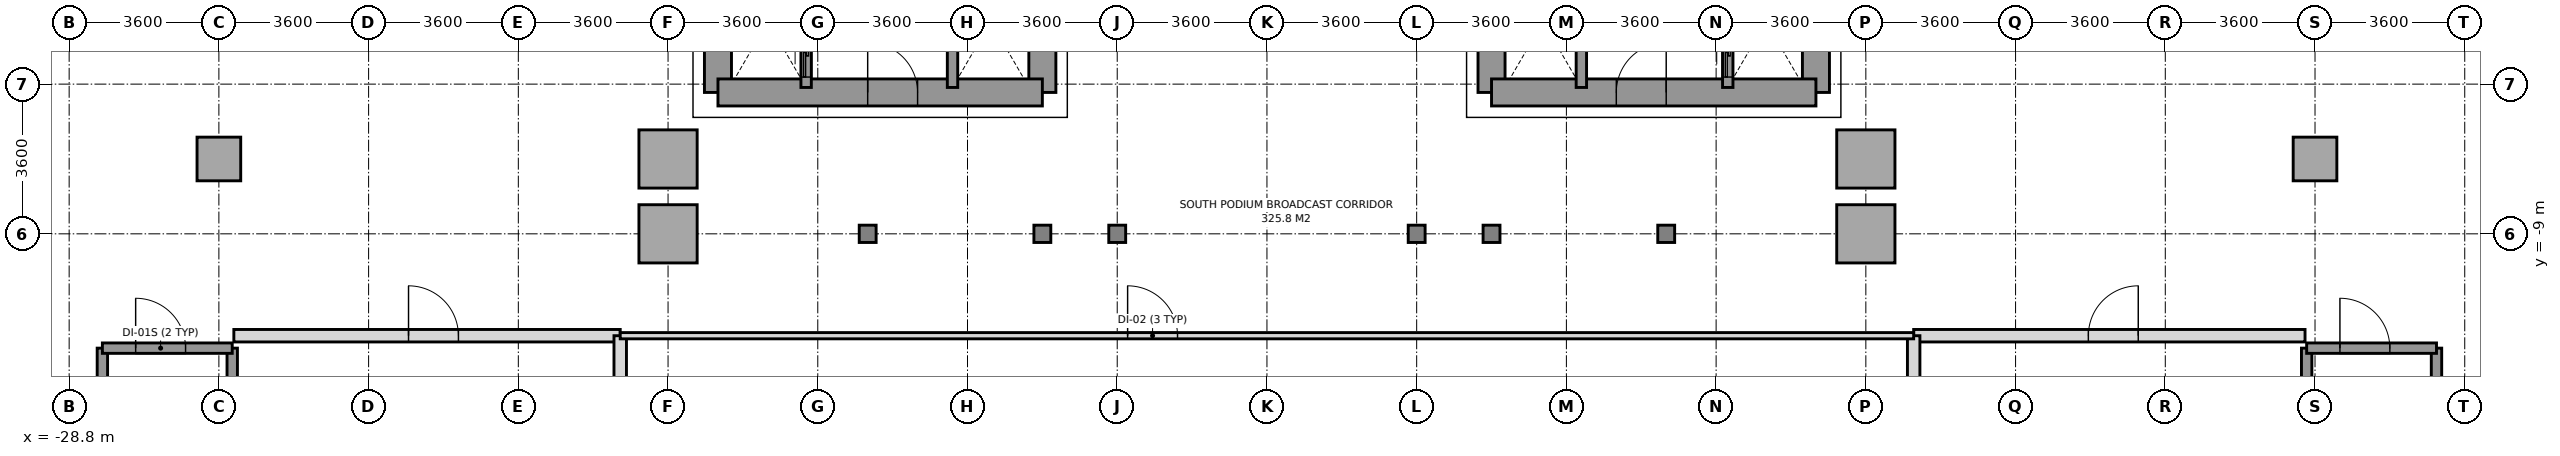
"""IFC4 building model, lengths in metres.
Left out: names, types, materials, properties, quantities, classifications, styles, units other than length and angle.
Written with IfcOpenShell. Run it as: python <this file> out.ifc"""

import sys

from ifc_helpers import new_model, si_unit, direction, frame, frame_2d, origin, origin_2d, place, context, subcontext, project, spatial, rectangle, i_section, extrude, source, transform, mapped, element, fill, save


model = new_model("IFC4")
c1 = context("Model", 3, precision=1e-05, world=origin(), true_north=direction((0.0, 1.0)))
c2 = subcontext(c1, "Body", "Model", "MODEL_VIEW")
j1 = project(units=[si_unit("LENGTHUNIT", "METRE"), si_unit("PLANEANGLEUNIT", "RADIAN")], contexts=[c1])
p1 = place(None, origin())
s1 = spatial("IfcSite", under=j1, at=p1, CompositionType="ELEMENT")
p2 = place(p1, origin())
s2 = spatial("IfcBuilding", under=s1, at=p2, CompositionType="ELEMENT")
p3 = place(p2, frame((0.0, 0.0, 15.6)))
s3 = spatial("IfcBuildingStorey", under=s2, at=p3, CompositionType="ELEMENT", Elevation=15.6)
m1 = source(origin(), c2, "Body", "SweptSolid", [
    extrude(rectangle(XDim=1.05, YDim=1.05, at=origin_2d()), origin(), (0.0, 0.0, 1.0), 4.55),
])
p4 = place(p3, frame((-25.2, -7.2, 0.0), z_axis=(0.0, 0.0, 1.0), x_axis=(1.0, 0.0, 0.0)))
e1 = element("IfcColumn", 1, at=p4, inside=s3, PredefinedType="COLUMN", context=c2, shape_type="MappedRepresentation", body=[
    mapped(m1, transform((0.0, 0.0, 0.0), x_axis=(1.0, 0.0, 0.0), y_axis=(0.0, 1.0, 0.0), z_axis=(0.0, 0.0, 1.0), scale=1.0)),
])
m2 = source(origin(), c2, "Body", "SweptSolid", [
    extrude(rectangle(XDim=1.4, YDim=1.4, at=origin_2d()), origin(), (0.0, 0.0, 1.0), 4.55),
])
for number, where, z_axis, x_axis in (
    (2, (-14.4, -9.0, 0.0), (0.0, 0.0, 1.0), (1.0, 0.0, 0.0)),
    (3, (-14.4, -7.2, 0.0), (0.0, 0.0, 1.0), (1.0, 0.0, 0.0)),
):
    element("IfcColumn", number, at=place(p3, frame(where, z_axis=z_axis, x_axis=x_axis)), inside=s3, PredefinedType="COLUMN", context=c2, shape_type="MappedRepresentation", body=[
        mapped(m2, transform((0.0, 0.0, 0.0), x_axis=(1.0, 0.0, 0.0), y_axis=(0.0, 1.0, 0.0), z_axis=(0.0, 0.0, 1.0), scale=1.0)),
    ])
m3 = source(origin(), c2, "Body", "SweptSolid", [
    extrude(i_section(OverallWidth=0.406, OverallDepth=0.416, WebThickness=0.024, FlangeThickness=0.039, at=origin_2d()), origin(), (0.0, 0.0, 1.0), 4.55),
])
for number, where, z_axis, x_axis in (
    (4, (-9.6, -9.0, 0.0), (0.0, 0.0, 1.0), (1.0, 0.0, 0.0)),
    (5, (-5.4, -9.0, 0.0), (0.0, 0.0, 1.0), (1.0, 0.0, 0.0)),
    (6, (-3.6, -9.0, 0.0), (0.0, 0.0, 1.0), (1.0, 0.0, 0.0)),
    (7, (3.6, -9.0, 0.0), (0.0, 0.0, 1.0), (1.0, 0.0, 0.0)),
    (8, (5.4, -9.0, 0.0), (0.0, 0.0, 1.0), (1.0, 0.0, 0.0)),
    (9, (9.6, -9.0, 0.0), (0.0, 0.0, 1.0), (1.0, 0.0, 0.0)),
):
    element("IfcColumn", number, at=place(p3, frame(where, z_axis=z_axis, x_axis=x_axis)), inside=s3, PredefinedType="COLUMN", context=c2, shape_type="MappedRepresentation", body=[
        mapped(m3, transform((0.0, 0.0, 0.0), x_axis=(1.0, 0.0, 0.0), y_axis=(0.0, 1.0, 0.0), z_axis=(0.0, 0.0, 1.0), scale=1.0)),
    ])
for number, where, z_axis, x_axis in (
    (10, (14.4, -9.0, 0.0), (0.0, 0.0, 1.0), (1.0, 0.0, 0.0)),
    (11, (14.4, -7.2, 0.0), (0.0, 0.0, 1.0), (1.0, 0.0, 0.0)),
):
    element("IfcColumn", number, at=place(p3, frame(where, z_axis=z_axis, x_axis=x_axis)), inside=s3, PredefinedType="COLUMN", context=c2, shape_type="MappedRepresentation", body=[
        mapped(m2, transform((0.0, 0.0, 0.0), x_axis=(1.0, 0.0, 0.0), y_axis=(0.0, 1.0, 0.0), z_axis=(0.0, 0.0, 1.0), scale=1.0)),
    ])
p5 = place(p3, frame((25.2, -7.2, 0.0), z_axis=(0.0, 0.0, 1.0), x_axis=(1.0, 0.0, 0.0)))
e12 = element("IfcColumn", 12, at=p5, inside=s3, PredefinedType="COLUMN", context=c2, shape_type="MappedRepresentation", body=[
    mapped(m1, transform((0.0, 0.0, 0.0), x_axis=(1.0, 0.0, 0.0), y_axis=(0.0, 1.0, 0.0), z_axis=(0.0, 0.0, 1.0), scale=1.0)),
])
p6 = place(p3, frame((-13.2, -5.6, 0.0), z_axis=(0.0, 0.0, 1.0), x_axis=(0.0, 1.0, 0.0)))
e13 = element("IfcWall", 13, at=p6, inside=s3, PredefinedType="SHEAR", context=c2, shape_type="SweptSolid", body=[
    extrude(rectangle(XDim=11.2, YDim=0.65, at=frame_2d((5.6, 0.0))), origin(), (0.0, 0.0, 1.0), 4.55),
])
p7 = place(p3, frame((-5.4, -5.6, 0.0), z_axis=(0.0, 0.0, 1.0), x_axis=(0.0, 1.0, 0.0)))
e14 = element("IfcWall", 14, at=p7, inside=s3, PredefinedType="SHEAR", context=c2, shape_type="SweptSolid", body=[
    extrude(rectangle(XDim=12.5, YDim=0.65, at=frame_2d((6.25, 0.0))), origin(), (0.0, 0.0, 1.0), 4.55),
])
p8 = place(p7, frame((4.55, 0.0, 0.0)))
e15 = element("IfcOpeningElement", 15, at=p8, cuts=e14, PredefinedType="OPENING", context=c2, shape_type="SweptSolid", body=[
    extrude(rectangle(XDim=1.2, YDim=2.2, at=frame_2d((0.6, 1.1))), frame((0.0, 0.335, 0.0), z_axis=(0.0, -1.0, 0.0), x_axis=(1.0, 0.0, 0.0)), (0.0, 0.0, 1.0), 0.67),
])
p9 = place(p7, frame((6.86, 0.0, 0.0)))
e16 = element("IfcOpeningElement", 16, at=p9, cuts=e14, PredefinedType="OPENING", context=c2, shape_type="SweptSolid", body=[
    extrude(rectangle(XDim=0.8, YDim=2.1, at=frame_2d((0.4, 1.05))), frame((0.0, 0.335, 0.0), z_axis=(0.0, -1.0, 0.0), x_axis=(1.0, 0.0, 0.0)), (0.0, 0.0, 1.0), 0.67),
])
p10 = place(p7, frame((7.88, 0.0, 0.0)))
e17 = element("IfcOpeningElement", 17, at=p10, cuts=e14, PredefinedType="OPENING", context=c2, shape_type="SweptSolid", body=[
    extrude(rectangle(XDim=0.8, YDim=2.1, at=frame_2d((0.4, 1.05))), frame((0.0, 0.335, 0.0), z_axis=(0.0, -1.0, 0.0), x_axis=(1.0, 0.0, 0.0)), (0.0, 0.0, 1.0), 0.67),
])
p11 = place(p3, frame((-13.2, -5.6, 0.0), z_axis=(0.0, 0.0, 1.0), x_axis=(1.0, 0.0, 0.0)))
e18 = element("IfcWall", 18, at=p11, inside=s3, PredefinedType="SHEAR", context=c2, shape_type="SweptSolid", body=[
    extrude(rectangle(XDim=7.8, YDim=0.65, at=frame_2d((3.9, 0.0))), origin(), (0.0, 0.0, 1.0), 4.55),
])
p12 = place(p11, frame((3.6, 0.0, 0.0)))
e19 = element("IfcOpeningElement", 19, at=p12, cuts=e18, PredefinedType="OPENING", context=c2, shape_type="SweptSolid", body=[
    extrude(rectangle(XDim=1.2, YDim=2.2, at=frame_2d((0.6, 1.1))), frame((0.0, 0.335, 0.0), z_axis=(0.0, -1.0, 0.0), x_axis=(1.0, 0.0, 0.0)), (0.0, 0.0, 1.0), 0.67),
])
p13 = place(p3, frame((13.2, -5.6, 0.0), z_axis=(0.0, 0.0, 1.0), x_axis=(0.0, 1.0, 0.0)))
e20 = element("IfcWall", 20, at=p13, inside=s3, PredefinedType="SHEAR", context=c2, shape_type="SweptSolid", body=[
    extrude(rectangle(XDim=11.2, YDim=0.65, at=frame_2d((5.6, 0.0))), origin(), (0.0, 0.0, 1.0), 4.55),
])
p14 = place(p3, frame((5.4, -5.6, 0.0), z_axis=(0.0, 0.0, 1.0), x_axis=(0.0, 1.0, 0.0)))
e21 = element("IfcWall", 21, at=p14, inside=s3, PredefinedType="SHEAR", context=c2, shape_type="SweptSolid", body=[
    extrude(rectangle(XDim=12.5, YDim=0.65, at=frame_2d((6.25, 0.0))), origin(), (0.0, 0.0, 1.0), 4.55),
])
p15 = place(p14, frame((4.55, 0.0, 0.0)))
e22 = element("IfcOpeningElement", 22, at=p15, cuts=e21, PredefinedType="OPENING", context=c2, shape_type="SweptSolid", body=[
    extrude(rectangle(XDim=1.2, YDim=2.2, at=frame_2d((0.6, 1.1))), frame((0.0, 0.335, 0.0), z_axis=(0.0, -1.0, 0.0), x_axis=(1.0, 0.0, 0.0)), (0.0, 0.0, 1.0), 0.67),
])
p16 = place(p3, frame((5.4, -5.6, 0.0), z_axis=(0.0, 0.0, 1.0), x_axis=(1.0, 0.0, 0.0)))
e23 = element("IfcWall", 23, at=p16, inside=s3, PredefinedType="SHEAR", context=c2, shape_type="SweptSolid", body=[
    extrude(rectangle(XDim=7.8, YDim=0.65, at=frame_2d((3.9, 0.0))), origin(), (0.0, 0.0, 1.0), 4.55),
])
p17 = place(p16, frame((3.0, 0.0, 0.0)))
e24 = element("IfcOpeningElement", 24, at=p17, cuts=e23, PredefinedType="OPENING", context=c2, shape_type="SweptSolid", body=[
    extrude(rectangle(XDim=1.2, YDim=2.2, at=frame_2d((0.6, 1.1))), frame((0.0, 0.335, 0.0), z_axis=(0.0, -1.0, 0.0), x_axis=(1.0, 0.0, 0.0)), (0.0, 0.0, 1.0), 0.67),
])
for number, where, z_axis, x_axis in (
    (25, (-28.001, -18.671, 0.0), (0.0, 0.0, 1.0), (0.0, 1.0, 0.0)),
    (26, (-24.879, -18.671, 0.0), (0.0, 0.0, 1.0), (0.0, 1.0, 0.0)),
):
    element("IfcWall", number, at=place(p3, frame(where, z_axis=z_axis, x_axis=x_axis)), inside=s3, PredefinedType="SOLIDWALL", context=c2, shape_type="SweptSolid", body=[
        extrude(rectangle(XDim=6.922, YDim=0.25, at=frame_2d((3.461, 0.0))), origin(), (0.0, 0.0, 1.0), 4.55),
    ])
p18 = place(p3, frame((-28.001, -11.749, 0.0), z_axis=(0.0, 0.0, 1.0), x_axis=(1.0, 0.0, 0.0)))
e27 = element("IfcWall", 27, at=p18, inside=s3, PredefinedType="SOLIDWALL", context=c2, shape_type="SweptSolid", body=[
    extrude(rectangle(XDim=3.122, YDim=0.25, at=frame_2d((1.561, 0.0))), origin(), (0.0, 0.0, 1.0), 4.55),
])
p19 = place(p18, frame((0.8, 0.0, 0.0)))
e28 = element("IfcOpeningElement", 28, at=p19, cuts=e27, PredefinedType="OPENING", context=c2, shape_type="SweptSolid", body=[
    extrude(rectangle(XDim=1.2, YDim=2.2, at=frame_2d((0.6, 1.1))), frame((0.0, 0.135, 0.0), z_axis=(0.0, -1.0, 0.0), x_axis=(1.0, 0.0, 0.0)), (0.0, 0.0, 1.0), 0.27),
])
for number, where, z_axis, x_axis in (
    (29, (24.999, -18.671, 0.0), (0.0, 0.0, 1.0), (0.0, 1.0, 0.0)),
    (30, (28.121, -18.671, 0.0), (0.0, 0.0, 1.0), (0.0, 1.0, 0.0)),
):
    element("IfcWall", number, at=place(p3, frame(where, z_axis=z_axis, x_axis=x_axis)), inside=s3, PredefinedType="SOLIDWALL", context=c2, shape_type="SweptSolid", body=[
        extrude(rectangle(XDim=6.922, YDim=0.25, at=frame_2d((3.461, 0.0))), origin(), (0.0, 0.0, 1.0), 4.55),
    ])
p20 = place(p3, frame((24.999, -11.749, 0.0), z_axis=(0.0, 0.0, 1.0), x_axis=(1.0, 0.0, 0.0)))
e31 = element("IfcWall", 31, at=p20, inside=s3, PredefinedType="SOLIDWALL", context=c2, shape_type="SweptSolid", body=[
    extrude(rectangle(XDim=3.122, YDim=0.25, at=frame_2d((1.561, 0.0))), origin(), (0.0, 0.0, 1.0), 4.55),
])
p21 = place(p20, frame((0.8, 0.0, 0.0)))
e32 = element("IfcOpeningElement", 32, at=p21, cuts=e31, PredefinedType="OPENING", context=c2, shape_type="SweptSolid", body=[
    extrude(rectangle(XDim=1.2, YDim=2.2, at=frame_2d((0.6, 1.1))), frame((0.0, 0.135, 0.0), z_axis=(0.0, -1.0, 0.0), x_axis=(1.0, 0.0, 0.0)), (0.0, 0.0, 1.0), 0.27),
])
p22 = place(p3, frame((-11.08, -5.48, 0.0), z_axis=(0.0, 0.0, 1.0), x_axis=(0.0, 1.0, 0.0)))
e33 = element("IfcWall", 33, at=p22, inside=s3, PredefinedType="SOLIDWALL", context=c2, shape_type="SweptSolid", body=[
    extrude(rectangle(XDim=1.6, YDim=0.25, at=frame_2d((0.8, 0.0))), origin(), (0.0, 0.0, 1.0), 4.55),
])
p23 = place(p22, frame((0.25, 0.0, 0.0)))
e34 = element("IfcOpeningElement", 34, at=p23, cuts=e33, PredefinedType="OPENING", context=c2, shape_type="SweptSolid", body=[
    extrude(rectangle(XDim=1.1, YDim=2.2, at=frame_2d((0.55, 1.1))), frame((0.0, 0.135, 0.0), z_axis=(0.0, -1.0, 0.0), x_axis=(1.0, 0.0, 0.0)), (0.0, 0.0, 1.0), 0.27),
])
p24 = place(p3, frame((11.08, -5.48, 0.0), z_axis=(0.0, 0.0, 1.0), x_axis=(0.0, 1.0, 0.0)))
e35 = element("IfcWall", 35, at=p24, inside=s3, PredefinedType="SOLIDWALL", context=c2, shape_type="SweptSolid", body=[
    extrude(rectangle(XDim=1.6, YDim=0.25, at=frame_2d((0.8, 0.0))), origin(), (0.0, 0.0, 1.0), 4.55),
])
p25 = place(p24, frame((0.25, 0.0, 0.0)))
e36 = element("IfcOpeningElement", 36, at=p25, cuts=e35, PredefinedType="OPENING", context=c2, shape_type="SweptSolid", body=[
    extrude(rectangle(XDim=1.1, YDim=2.2, at=frame_2d((0.55, 1.1))), frame((0.0, 0.135, 0.0), z_axis=(0.0, -1.0, 0.0), x_axis=(1.0, 0.0, 0.0)), (0.0, 0.0, 1.0), 0.27),
])
for number, where, z_axis, x_axis in (
    (37, (-7.56, -5.48, 0.0), (0.0, 0.0, 1.0), (0.0, 1.0, 0.0)),
    (38, (7.56, -5.48, 0.0), (0.0, 0.0, 1.0), (0.0, 1.0, 0.0)),
):
    element("IfcWall", number, at=place(p3, frame(where, z_axis=z_axis, x_axis=x_axis)), inside=s3, PredefinedType="SOLIDWALL", context=c2, shape_type="SweptSolid", body=[
        extrude(rectangle(XDim=1.6, YDim=0.25, at=frame_2d((0.8, 0.0))), origin(), (0.0, 0.0, 1.0), 4.55),
    ])
p26 = place(p3, frame((-24.84, -11.45, 0.0), z_axis=(0.0, 0.0, 1.0), x_axis=(1.0, 0.0, 0.0)))
e39 = element("IfcWall", 39, at=p26, inside=s3, PredefinedType="SOLIDWALL", context=c2, shape_type="SweptSolid", body=[
    extrude(rectangle(XDim=9.29, YDim=0.3, at=frame_2d((4.645, 0.0))), origin(), (0.0, 0.0, 1.0), 4.55),
])
p27 = place(p26, frame((4.2, 0.0, 0.0)))
e40 = element("IfcOpeningElement", 40, at=p27, cuts=e39, PredefinedType="OPENING", context=c2, shape_type="SweptSolid", body=[
    extrude(rectangle(XDim=1.2, YDim=2.2, at=frame_2d((0.6, 1.1))), frame((0.0, 0.16, 0.0), z_axis=(0.0, -1.0, 0.0), x_axis=(1.0, 0.0, 0.0)), (0.0, 0.0, 1.0), 0.32),
])
p28 = place(p3, frame((-15.55, -19.45, 0.0), z_axis=(0.0, 0.0, 1.0), x_axis=(0.0, 1.0, 0.0)))
e41 = element("IfcWall", 41, at=p28, inside=s3, PredefinedType="SOLIDWALL", context=c2, shape_type="SweptSolid", body=[
    extrude(rectangle(XDim=8.0, YDim=0.3, at=frame_2d((4.0, 0.0))), origin(), (0.0, 0.0, 1.0), 3.8),
])
p29 = place(p3, frame((15.55, -11.45, 0.0), z_axis=(0.0, 0.0, 1.0), x_axis=(1.0, 0.0, 0.0)))
e42 = element("IfcWall", 42, at=p29, inside=s3, PredefinedType="SOLIDWALL", context=c2, shape_type="SweptSolid", body=[
    extrude(rectangle(XDim=9.41, YDim=0.3, at=frame_2d((4.705, 0.0))), origin(), (0.0, 0.0, 1.0), 4.55),
])
p30 = place(p29, frame((4.2, 0.0, 0.0)))
e43 = element("IfcOpeningElement", 43, at=p30, cuts=e42, PredefinedType="OPENING", context=c2, shape_type="SweptSolid", body=[
    extrude(rectangle(XDim=1.2, YDim=2.2, at=frame_2d((0.6, 1.1))), frame((0.0, 0.16, 0.0), z_axis=(0.0, -1.0, 0.0), x_axis=(1.0, 0.0, 0.0)), (0.0, 0.0, 1.0), 0.32),
])
p31 = place(p3, frame((15.55, -19.45, 0.0), z_axis=(0.0, 0.0, 1.0), x_axis=(0.0, 1.0, 0.0)))
e44 = element("IfcWall", 44, at=p31, inside=s3, PredefinedType="SOLIDWALL", context=c2, shape_type="SweptSolid", body=[
    extrude(rectangle(XDim=8.0, YDim=0.3, at=frame_2d((4.0, 0.0))), origin(), (0.0, 0.0, 1.0), 3.8),
])
p32 = place(p3, frame((-15.55, -11.45, 0.0), z_axis=(0.0, 0.0, 1.0), x_axis=(1.0, 0.0, 0.0)))
e45 = element("IfcWall", 45, at=p32, inside=s3, PredefinedType="PARTITIONING", context=c2, shape_type="SweptSolid", body=[
    extrude(rectangle(XDim=31.1, YDim=0.15, at=frame_2d((15.55, 0.0))), origin(), (0.0, 0.0, 1.0), 3.95),
])
p33 = place(p32, frame((12.2, 0.0, 0.0)))
e46 = element("IfcOpeningElement", 46, at=p33, cuts=e45, PredefinedType="OPENING", context=c2, shape_type="SweptSolid", body=[
    extrude(rectangle(XDim=1.2, YDim=2.2, at=frame_2d((0.6, 1.1))), frame((0.0, 0.085, 0.0), z_axis=(0.0, -1.0, 0.0), x_axis=(1.0, 0.0, 0.0)), (0.0, 0.0, 1.0), 0.17),
])
m4 = source(origin(), c2, "Body", "SweptSolid", [
    extrude(rectangle(XDim=1.2, YDim=2.2, at=frame_2d((0.6, 1.1))), frame((0.0, 0.025, 0.0), z_axis=(0.0, -1.0, 0.0), x_axis=(1.0, 0.0, 0.0)), (0.0, 0.0, 1.0), 0.05),
])
p34 = place(p12, origin())
e47 = element("IfcDoor", 47, at=p34, inside=s3, OperationType="SINGLE_SWING_LEFT", PredefinedType="DOOR", context=c2, shape_type="MappedRepresentation", body=[
    mapped(m4, transform((0.0, 0.0, 0.0), x_axis=(1.0, 0.0, 0.0), y_axis=(0.0, 1.0, 0.0), z_axis=(0.0, 0.0, 1.0), scale=1.0)),
])
fill(e19, e47)
p35 = place(p17, origin())
e48 = element("IfcDoor", 48, at=p35, inside=s3, OperationType="SINGLE_SWING_RIGHT", PredefinedType="DOOR", context=c2, shape_type="MappedRepresentation", body=[
    mapped(m4, transform((0.0, 0.0, 0.0), x_axis=(1.0, 0.0, 0.0), y_axis=(0.0, 1.0, 0.0), z_axis=(0.0, 0.0, 1.0), scale=1.0)),
])
fill(e24, e48)
p36 = place(p19, origin())
e49 = element("IfcDoor", 49, at=p36, inside=s3, OperationType="SINGLE_SWING_LEFT", PredefinedType="DOOR", context=c2, shape_type="MappedRepresentation", body=[
    mapped(m4, transform((0.0, 0.0, 0.0), x_axis=(1.0, 0.0, 0.0), y_axis=(0.0, 1.0, 0.0), z_axis=(0.0, 0.0, 1.0), scale=1.0)),
])
fill(e28, e49)
p37 = place(p21, origin())
e50 = element("IfcDoor", 50, at=p37, inside=s3, OperationType="SINGLE_SWING_LEFT", PredefinedType="DOOR", context=c2, shape_type="MappedRepresentation", body=[
    mapped(m4, transform((0.0, 0.0, 0.0), x_axis=(1.0, 0.0, 0.0), y_axis=(0.0, 1.0, 0.0), z_axis=(0.0, 0.0, 1.0), scale=1.0)),
])
fill(e32, e50)
m5 = source(origin(), c2, "Body", "SweptSolid", [
    extrude(rectangle(XDim=1.1, YDim=2.2, at=frame_2d((0.55, 1.1))), frame((0.0, 0.025, 0.0), z_axis=(0.0, -1.0, 0.0), x_axis=(1.0, 0.0, 0.0)), (0.0, 0.0, 1.0), 0.05),
])
p38 = place(p23, origin())
e51 = element("IfcDoor", 51, at=p38, inside=s3, OperationType="SLIDING_TO_LEFT", PredefinedType="DOOR", context=c2, shape_type="MappedRepresentation", body=[
    mapped(m5, transform((0.0, 0.0, 0.0), x_axis=(1.0, 0.0, 0.0), y_axis=(0.0, 1.0, 0.0), z_axis=(0.0, 0.0, 1.0), scale=1.0)),
])
fill(e34, e51)
p39 = place(p25, origin())
e52 = element("IfcDoor", 52, at=p39, inside=s3, OperationType="SLIDING_TO_LEFT", PredefinedType="DOOR", context=c2, shape_type="MappedRepresentation", body=[
    mapped(m5, transform((0.0, 0.0, 0.0), x_axis=(1.0, 0.0, 0.0), y_axis=(0.0, 1.0, 0.0), z_axis=(0.0, 0.0, 1.0), scale=1.0)),
])
fill(e36, e52)
p40 = place(p27, origin())
e53 = element("IfcDoor", 53, at=p40, inside=s3, OperationType="SINGLE_SWING_LEFT", PredefinedType="DOOR", context=c2, shape_type="MappedRepresentation", body=[
    mapped(m4, transform((0.0, 0.0, 0.0), x_axis=(1.0, 0.0, 0.0), y_axis=(0.0, 1.0, 0.0), z_axis=(0.0, 0.0, 1.0), scale=1.0)),
])
fill(e40, e53)
p41 = place(p30, origin())
e54 = element("IfcDoor", 54, at=p41, inside=s3, OperationType="SINGLE_SWING_RIGHT", PredefinedType="DOOR", context=c2, shape_type="MappedRepresentation", body=[
    mapped(m4, transform((0.0, 0.0, 0.0), x_axis=(1.0, 0.0, 0.0), y_axis=(0.0, 1.0, 0.0), z_axis=(0.0, 0.0, 1.0), scale=1.0)),
])
fill(e43, e54)
p42 = place(p33, origin())
e55 = element("IfcDoor", 55, at=p42, inside=s3, OperationType="SINGLE_SWING_LEFT", PredefinedType="DOOR", context=c2, shape_type="MappedRepresentation", body=[
    mapped(m4, transform((0.0, 0.0, 0.0), x_axis=(1.0, 0.0, 0.0), y_axis=(0.0, 1.0, 0.0), z_axis=(0.0, 0.0, 1.0), scale=1.0)),
])
fill(e46, e55)
save(model, sys.argv[1])
